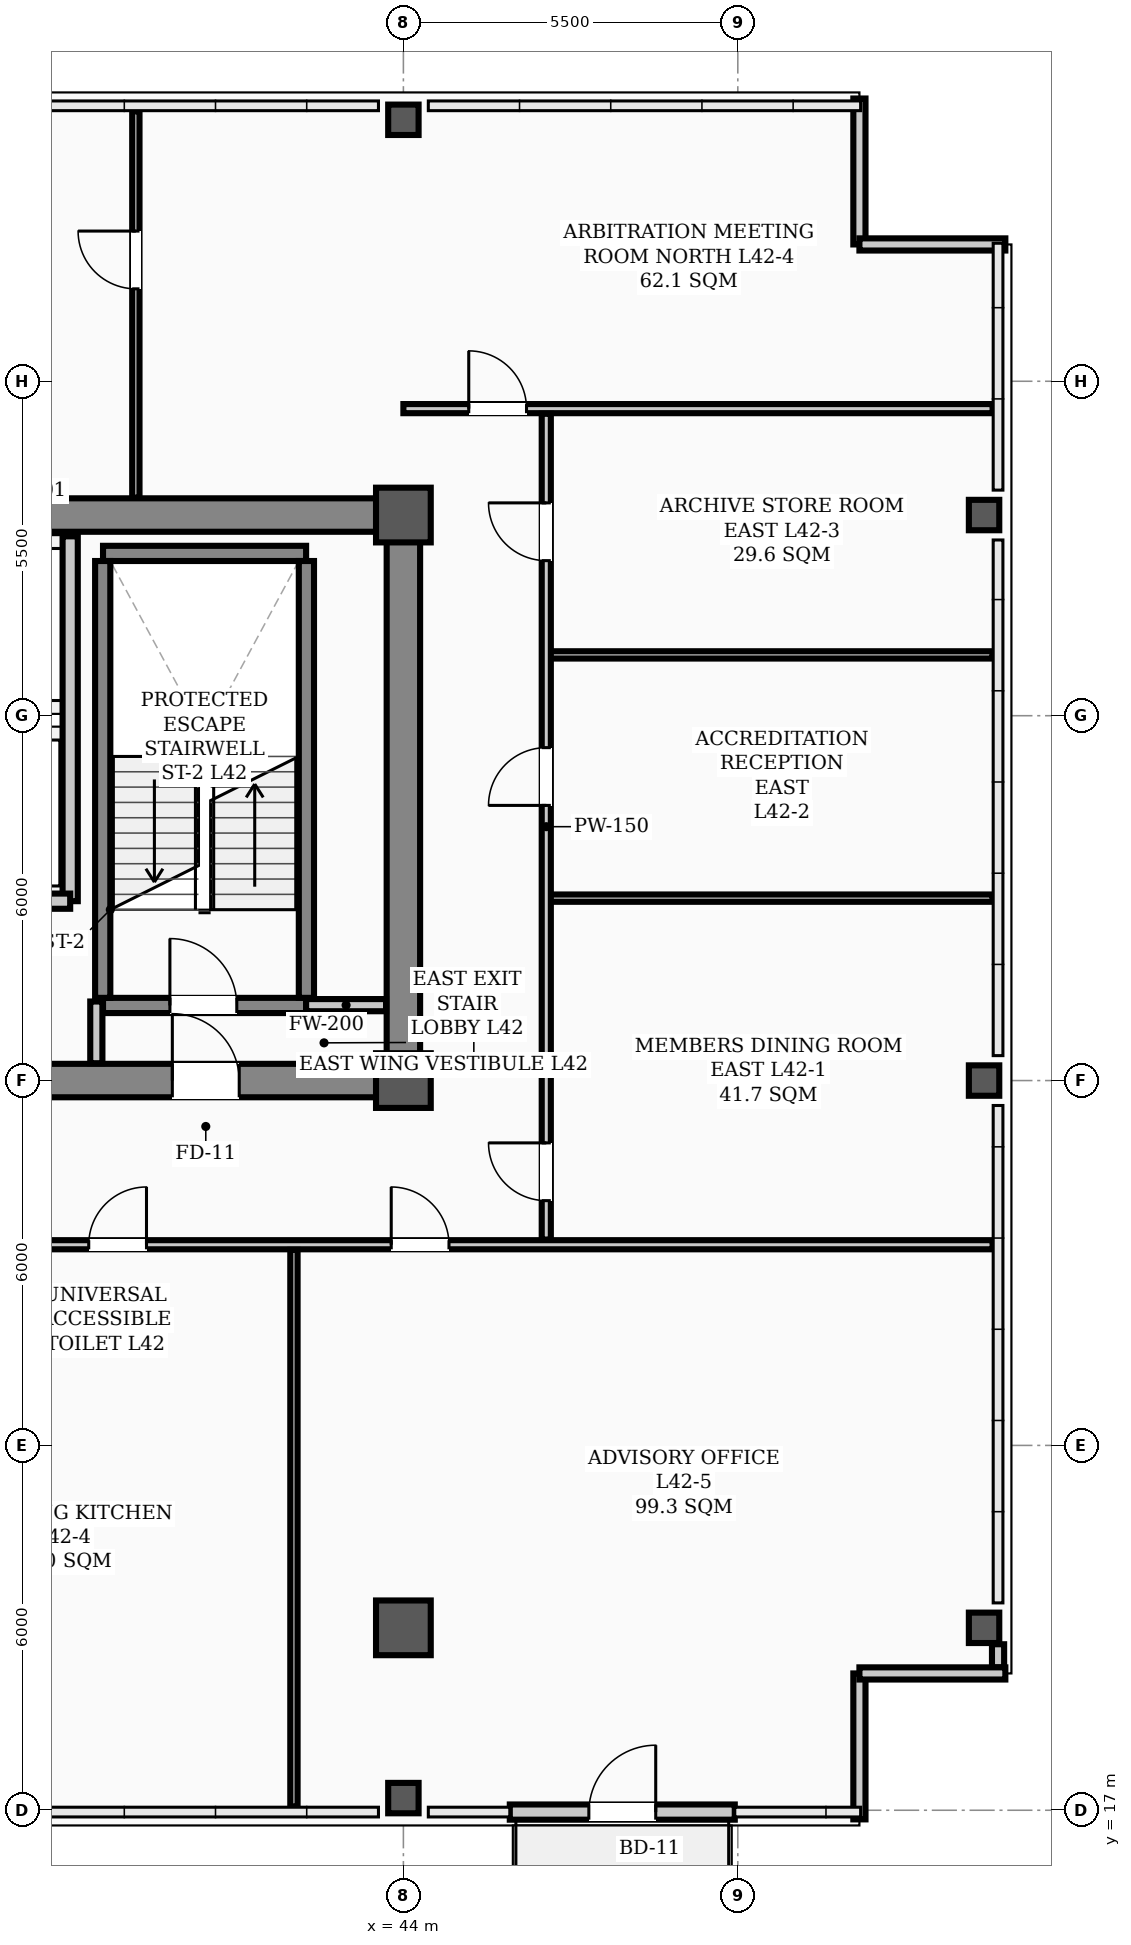
"""IFC4 building model, lengths in metres.
Left out: names, types, materials, properties, quantities, classifications, styles, units other than length and angle.
Written with IfcOpenShell. Run it as: python <this file> out.ifc"""

import sys

from ifc_helpers import new_model, si_unit, direction, frame, frame_2d, origin, origin_2d, place, context, subcontext, project, spatial, rectangle, hollow_rectangle, extrude, element, fill, save


model = new_model("IFC4")
c1 = context("Model", 3, precision=1e-05, world=origin(), true_north=direction((0.0, 1.0)))
c2 = subcontext(c1, "Body", "Model", "MODEL_VIEW")
j1 = project(units=[si_unit("LENGTHUNIT", "METRE"), si_unit("PLANEANGLEUNIT", "RADIAN")], contexts=[c1])
p1 = place(None, origin())
s1 = spatial("IfcSite", under=j1, at=p1, CompositionType="ELEMENT")
p2 = place(p1, origin())
s2 = spatial("IfcBuilding", under=s1, at=p2, CompositionType="ELEMENT")
p3 = place(p2, frame((0.0, 0.0, 169.5)))
s3 = spatial("IfcBuildingStorey", under=s2, at=p3, CompositionType="ELEMENT", Elevation=169.5)
for number, where, z_axis, x_axis in (
    (1, (44.0, 29.0, 0.0), (0.0, 0.0, 1.0), (1.0, 0.0, 0.0)),
    (2, (44.0, 38.3, 0.0), (0.0, 0.0, 1.0), (1.0, 0.0, 0.0)),
    (3, (44.0, 20.0, 0.0), (0.0, 0.0, 1.0), (1.0, 0.0, 0.0)),
):
    element("IfcColumn", number, at=place(p3, frame(where, z_axis=z_axis, x_axis=x_axis)), inside=s3, PredefinedType="COLUMN", context=c2, shape_type="SweptSolid", body=[
        extrude(hollow_rectangle(XDim=0.9, YDim=0.9, WallThickness=0.035, InnerFilletRadius=0.017, OuterFilletRadius=0.052, at=origin_2d()), origin(), (0.0, 0.0, 1.0), 3.9),
    ])
for number, where, z_axis, x_axis in (
    (4, (44.0, 17.2, 0.0), (0.0, 0.0, 1.0), (1.0, 0.0, 0.0)),
    (5, (44.0, 44.8, 0.0), (0.0, 0.0, 1.0), (1.0, 0.0, 0.0)),
    (6, (53.55, 20.0, 0.0), (0.0, 0.0, 1.0), (1.0, 0.0, 0.0)),
    (7, (53.55, 29.0, 0.0), (0.0, 0.0, 1.0), (1.0, 0.0, 0.0)),
    (8, (53.55, 38.3, 0.0), (0.0, 0.0, 1.0), (1.0, 0.0, 0.0)),
):
    element("IfcColumn", number, at=place(p3, frame(where, z_axis=z_axis, x_axis=x_axis)), inside=s3, PredefinedType="COLUMN", context=c2, shape_type="SweptSolid", body=[
        extrude(hollow_rectangle(XDim=0.5, YDim=0.5, WallThickness=0.024, InnerFilletRadius=0.012, OuterFilletRadius=0.036, at=origin_2d()), origin(), (0.0, 0.0, 1.0), 3.9),
    ])
p4 = place(p3, frame((53.78, 19.35, 0.0), z_axis=(0.0, 0.0, 1.0), x_axis=(0.0, 1.0, 0.0)))
e9 = element("IfcWall", 9, at=p4, inside=s3, PredefinedType="PARAPET", context=c2, shape_type="SweptSolid", body=[
    extrude(rectangle(XDim=0.38, YDim=0.2, at=frame_2d((0.19, 0.0))), origin(), (0.0, 0.0, 1.0), 1.2),
])
for number, where, z_axis, x_axis in (
    (10, (51.5, 16.85, 0.0), (0.0, 0.0, 1.0), (0.0, 1.0, 0.0)),
    (11, (51.5, 19.25, 0.0), (0.0, 0.0, 1.0), (1.0, 0.0, 0.0)),
    (12, (51.5, 45.15, 0.0), (0.0, 0.0, 1.0), (0.0, -1.0, 0.0)),
    (13, (51.5, 42.75, 0.0), (0.0, 0.0, 1.0), (1.0, 0.0, 0.0)),
):
    element("IfcWall", number, at=place(p3, frame(where, z_axis=z_axis, x_axis=x_axis)), inside=s3, PredefinedType="PARAPET", context=c2, shape_type="SweptSolid", body=[
        extrude(rectangle(XDim=2.4, YDim=0.2, at=frame_2d((1.2, 0.0))), origin(), (0.0, 0.0, 1.0), 1.2),
    ])
p5 = place(p3, frame((45.75, 16.97, 0.0), z_axis=(0.0, 0.0, 1.0), x_axis=(1.0, 0.0, 0.0)))
e14 = element("IfcWall", 14, at=p5, inside=s3, PredefinedType="STANDARD", context=c2, shape_type="SweptSolid", body=[
    extrude(rectangle(XDim=3.7, YDim=0.25, at=frame_2d((1.85, 0.0))), origin(), (0.0, 0.0, 1.0), 3.18),
])
p6 = place(p5, frame((1.3, 0.0, 0.0)))
e15 = element("IfcOpeningElement", 15, at=p6, cuts=e14, PredefinedType="OPENING", context=c2, shape_type="SweptSolid", body=[
    extrude(rectangle(XDim=1.1, YDim=2.2, at=frame_2d((0.55, 1.1))), frame((0.0, 0.135, 0.0), z_axis=(0.0, -1.0, 0.0), x_axis=(1.0, 0.0, 0.0)), (0.0, 0.0, 1.0), 0.27),
])
p7 = place(p3, frame((13.5, 29.0, 0.0), z_axis=(0.0, 0.0, 1.0), x_axis=(1.0, 0.0, 0.0)))
e16 = element("IfcWall", 16, at=p7, inside=s3, PredefinedType="SHEAR", context=c2, shape_type="SweptSolid", body=[
    extrude(rectangle(XDim=30.5, YDim=0.55, at=frame_2d((15.25, 0.0))), origin(), (0.0, 0.0, 1.0), 3.72),
])
p8 = place(p7, frame((1.75, 0.0, 0.0)))
e17 = element("IfcOpeningElement", 17, at=p8, cuts=e16, PredefinedType="OPENING", context=c2, shape_type="SweptSolid", body=[
    extrude(rectangle(XDim=1.1, YDim=2.08, at=frame_2d((0.55, 1.04))), frame((0.0, 0.285, 0.0), z_axis=(0.0, -1.0, 0.0), x_axis=(1.0, 0.0, 0.0)), (0.0, 0.0, 1.0), 0.57),
])
p9 = place(p7, frame((26.7, 0.0, 0.0)))
e18 = element("IfcOpeningElement", 18, at=p9, cuts=e16, PredefinedType="OPENING", context=c2, shape_type="SweptSolid", body=[
    extrude(rectangle(XDim=1.1, YDim=2.08, at=frame_2d((0.55, 1.04))), frame((0.0, 0.285, 0.0), z_axis=(0.0, -1.0, 0.0), x_axis=(1.0, 0.0, 0.0)), (0.0, 0.0, 1.0), 0.57),
])
p10 = place(p7, frame((6.8, 0.0, 0.0)))
e19 = element("IfcOpeningElement", 19, at=p10, cuts=e16, PredefinedType="OPENING", context=c2, shape_type="SweptSolid", body=[
    extrude(rectangle(XDim=1.1, YDim=2.08, at=frame_2d((0.55, 1.04))), frame((0.0, 0.285, 0.0), z_axis=(0.0, -1.0, 0.0), x_axis=(1.0, 0.0, 0.0)), (0.0, 0.0, 1.0), 0.57),
])
p11 = place(p7, frame((13.2, 0.0, 0.0)))
e20 = element("IfcOpeningElement", 20, at=p11, cuts=e16, PredefinedType="OPENING", context=c2, shape_type="SweptSolid", body=[
    extrude(rectangle(XDim=1.6, YDim=2.08, at=frame_2d((0.8, 1.04))), frame((0.0, 0.285, 0.0), z_axis=(0.0, -1.0, 0.0), x_axis=(1.0, 0.0, 0.0)), (0.0, 0.0, 1.0), 0.57),
])
p12 = place(p7, frame((20.525, 0.0, 0.0)))
e21 = element("IfcOpeningElement", 21, at=p12, cuts=e16, PredefinedType="OPENING", context=c2, shape_type="SweptSolid", body=[
    extrude(rectangle(XDim=0.95, YDim=2.08, at=frame_2d((0.475, 1.04))), frame((0.0, 0.285, 0.0), z_axis=(0.0, -1.0, 0.0), x_axis=(1.0, 0.0, 0.0)), (0.0, 0.0, 1.0), 0.57),
])
p13 = place(p3, frame((13.5, 38.3, 0.0), z_axis=(0.0, 0.0, 1.0), x_axis=(1.0, 0.0, 0.0)))
e22 = element("IfcWall", 22, at=p13, inside=s3, PredefinedType="SHEAR", context=c2, shape_type="SweptSolid", body=[
    extrude(rectangle(XDim=30.5, YDim=0.55, at=frame_2d((15.25, 0.0))), origin(), (0.0, 0.0, 1.0), 3.72),
])
p14 = place(p3, frame((44.0, 29.35, 0.0), z_axis=(0.0, 0.0, 1.0), x_axis=(0.0, 1.0, 0.0)))
e23 = element("IfcWall", 23, at=p14, inside=s3, PredefinedType="SHEAR", context=c2, shape_type="SweptSolid", body=[
    extrude(rectangle(XDim=8.6, YDim=0.55, at=frame_2d((4.3, 0.0))), origin(), (0.0, 0.0, 1.0), 3.72),
])
p15 = place(p3, frame((39.06, 30.235, 0.0), z_axis=(0.0, 0.0, 1.0), x_axis=(1.0, 0.0, 0.0)))
e24 = element("IfcWall", 24, at=p15, inside=s3, PredefinedType="STANDARD", context=c2, shape_type="SweptSolid", body=[
    extrude(rectangle(XDim=3.34, YDim=0.25, at=frame_2d((1.67, 0.0))), origin(), (0.0, 0.0, 1.0), 3.72),
])
p16 = place(p15, frame((1.1, 0.0, 0.0)))
e25 = element("IfcOpeningElement", 25, at=p16, cuts=e24, PredefinedType="OPENING", context=c2, shape_type="SweptSolid", body=[
    extrude(rectangle(XDim=1.1, YDim=2.08, at=frame_2d((0.55, 1.04))), frame((0.0, 0.135, 0.0), z_axis=(0.0, -1.0, 0.0), x_axis=(1.0, 0.0, 0.0)), (0.0, 0.0, 1.0), 0.27),
])
p17 = place(p3, frame((39.06, 37.669, 0.0), z_axis=(0.0, 0.0, 1.0), x_axis=(1.0, 0.0, 0.0)))
e26 = element("IfcWall", 26, at=p17, inside=s3, PredefinedType="STANDARD", context=c2, shape_type="SweptSolid", body=[
    extrude(rectangle(XDim=3.34, YDim=0.25, at=frame_2d((1.67, 0.0))), origin(), (0.0, 0.0, 1.0), 3.72),
])
for number, where, z_axis, x_axis in (
    (27, (39.055, 30.36, 0.0), (0.0, 0.0, 1.0), (0.0, 1.0, 0.0)),
    (28, (42.405, 30.36, 0.0), (0.0, 0.0, 1.0), (0.0, 1.0, 0.0)),
):
    element("IfcWall", number, at=place(p3, frame(where, z_axis=z_axis, x_axis=x_axis)), inside=s3, PredefinedType="STANDARD", context=c2, shape_type="SweptSolid", body=[
        extrude(rectangle(XDim=7.184, YDim=0.25, at=frame_2d((3.592, 0.0))), origin(), (0.0, 0.0, 1.0), 3.72),
    ])
p18 = place(p3, frame((38.52, 31.95, 0.0), z_axis=(0.0, 0.0, 1.0), x_axis=(0.0, 1.0, 0.0)))
e29 = element("IfcWall", 29, at=p18, inside=s3, PredefinedType="STANDARD", context=c2, shape_type="SweptSolid", body=[
    extrude(rectangle(XDim=6.0, YDim=0.25, at=frame_2d((3.0, 0.0))), origin(), (0.0, 0.0, 1.0), 3.35),
])
p19 = place(p3, frame((36.62, 31.95, 0.0), z_axis=(0.0, 0.0, 1.0), x_axis=(1.0, 0.0, 0.0)))
e30 = element("IfcWall", 30, at=p19, inside=s3, PredefinedType="STANDARD", context=c2, shape_type="SweptSolid", body=[
    extrude(rectangle(XDim=1.9, YDim=0.25, at=frame_2d((0.95, 0.0))), origin(), (0.0, 0.0, 1.0), 3.48),
])
p20 = place(p3, frame((42.4, 30.24, 0.0), z_axis=(0.0, 0.0, 1.0), x_axis=(1.0, 0.0, 0.0)))
e31 = element("IfcWall", 31, at=p20, inside=s3, PredefinedType="STANDARD", context=c2, shape_type="SweptSolid", body=[
    extrude(rectangle(XDim=1.315, YDim=0.2, at=frame_2d((0.658, 0.0))), origin(), (0.0, 0.0, 1.0), 3.2),
])
p21 = place(p3, frame((10.31, 26.3, 0.0), z_axis=(0.0, 0.0, 1.0), x_axis=(1.0, 0.0, 0.0)))
e32 = element("IfcWall", 32, at=p21, inside=s3, PredefinedType="PARTITIONING", context=c2, shape_type="SweptSolid", body=[
    extrude(rectangle(XDim=43.38, YDim=0.15, at=frame_2d((21.69, 0.0))), origin(), (0.0, 0.0, 1.0), 3.2),
])
p22 = place(p21, frame((4.87, 0.0, 0.0)))
e33 = element("IfcOpeningElement", 33, at=p22, cuts=e32, PredefinedType="OPENING", context=c2, shape_type="SweptSolid", body=[
    extrude(rectangle(XDim=0.95, YDim=2.08, at=frame_2d((0.475, 1.04))), frame((0.0, 0.085, 0.0), z_axis=(0.0, -1.0, 0.0), x_axis=(1.0, 0.0, 0.0)), (0.0, 0.0, 1.0), 0.17),
])
p23 = place(p21, frame((11.115, 0.0, 0.0)))
e34 = element("IfcOpeningElement", 34, at=p23, cuts=e32, PredefinedType="OPENING", context=c2, shape_type="SweptSolid", body=[
    extrude(rectangle(XDim=0.95, YDim=2.08, at=frame_2d((0.475, 1.04))), frame((0.0, 0.085, 0.0), z_axis=(0.0, -1.0, 0.0), x_axis=(1.0, 0.0, 0.0)), (0.0, 0.0, 1.0), 0.17),
])
p24 = place(p21, frame((17.915, 0.0, 0.0)))
e35 = element("IfcOpeningElement", 35, at=p24, cuts=e32, PredefinedType="OPENING", context=c2, shape_type="SweptSolid", body=[
    extrude(rectangle(XDim=0.95, YDim=2.08, at=frame_2d((0.475, 1.04))), frame((0.0, 0.085, 0.0), z_axis=(0.0, -1.0, 0.0), x_axis=(1.0, 0.0, 0.0)), (0.0, 0.0, 1.0), 0.17),
])
p25 = place(p21, frame((28.515, 0.0, 0.0)))
e36 = element("IfcOpeningElement", 36, at=p25, cuts=e32, PredefinedType="OPENING", context=c2, shape_type="SweptSolid", body=[
    extrude(rectangle(XDim=0.95, YDim=2.08, at=frame_2d((0.475, 1.04))), frame((0.0, 0.085, 0.0), z_axis=(0.0, -1.0, 0.0), x_axis=(1.0, 0.0, 0.0)), (0.0, 0.0, 1.0), 0.17),
])
p26 = place(p21, frame((33.49, 0.0, 0.0)))
e37 = element("IfcOpeningElement", 37, at=p26, cuts=e32, PredefinedType="OPENING", context=c2, shape_type="SweptSolid", body=[
    extrude(rectangle(XDim=0.95, YDim=2.08, at=frame_2d((0.475, 1.04))), frame((0.0, 0.085, 0.0), z_axis=(0.0, -1.0, 0.0), x_axis=(1.0, 0.0, 0.0)), (0.0, 0.0, 1.0), 0.17),
])
for number, where, z_axis, x_axis in (
    (38, (46.35, 32.0, 0.0), (0.0, 0.0, 1.0), (1.0, 0.0, 0.0)),
    (39, (46.35, 36.0, 0.0), (0.0, 0.0, 1.0), (1.0, 0.0, 0.0)),
):
    element("IfcWall", number, at=place(p3, frame(where, z_axis=z_axis, x_axis=x_axis)), inside=s3, PredefinedType="PARTITIONING", context=c2, shape_type="SweptSolid", body=[
        extrude(rectangle(XDim=7.34, YDim=0.12, at=frame_2d((3.67, 0.0))), origin(), (0.0, 0.0, 1.0), 3.212),
    ])
p27 = place(p3, frame((44.0, 40.05, 0.0), z_axis=(0.0, 0.0, 1.0), x_axis=(1.0, 0.0, 0.0)))
e40 = element("IfcWall", 40, at=p27, inside=s3, PredefinedType="PARTITIONING", context=c2, shape_type="SweptSolid", body=[
    extrude(rectangle(XDim=9.69, YDim=0.15, at=frame_2d((4.845, 0.0))), origin(), (0.0, 0.0, 1.0), 3.2),
])
p28 = place(p27, frame((1.075, 0.0, 0.0)))
e41 = element("IfcOpeningElement", 41, at=p28, cuts=e40, PredefinedType="OPENING", context=c2, shape_type="SweptSolid", body=[
    extrude(rectangle(XDim=0.95, YDim=2.08, at=frame_2d((0.475, 1.04))), frame((0.0, 0.085, 0.0), z_axis=(0.0, -1.0, 0.0), x_axis=(1.0, 0.0, 0.0)), (0.0, 0.0, 1.0), 0.17),
])
p29 = place(p3, frame((38.95, 29.285, 0.0), z_axis=(0.0, 0.0, 1.0), x_axis=(0.0, 1.0, 0.0)))
e42 = element("IfcWall", 42, at=p29, inside=s3, PredefinedType="STANDARD", context=c2, shape_type="SweptSolid", body=[
    extrude(rectangle(XDim=1.015, YDim=0.2, at=frame_2d((0.508, 0.0))), origin(), (0.0, 0.0, 1.0), 3.35),
])
p30 = place(p3, frame((46.35, 26.385, 0.0), z_axis=(0.0, 0.0, 1.0), x_axis=(0.0, 1.0, 0.0)))
e43 = element("IfcWall", 43, at=p30, inside=s3, PredefinedType="PARTITIONING", context=c2, shape_type="SweptSolid", body=[
    extrude(rectangle(XDim=13.58, YDim=0.15, at=frame_2d((6.79, 0.0))), origin(), (0.0, 0.0, 1.0), 3.1),
])
p31 = place(p30, frame((0.64, 0.0, 0.0)))
e44 = element("IfcOpeningElement", 44, at=p31, cuts=e43, PredefinedType="OPENING", context=c2, shape_type="SweptSolid", body=[
    extrude(rectangle(XDim=0.95, YDim=2.08, at=frame_2d((0.475, 1.04))), frame((0.0, 0.085, 0.0), z_axis=(0.0, -1.0, 0.0), x_axis=(1.0, 0.0, 0.0)), (0.0, 0.0, 1.0), 0.17),
])
p32 = place(p30, frame((7.14, 0.0, 0.0)))
e45 = element("IfcOpeningElement", 45, at=p32, cuts=e43, PredefinedType="OPENING", context=c2, shape_type="SweptSolid", body=[
    extrude(rectangle(XDim=0.95, YDim=2.08, at=frame_2d((0.475, 1.04))), frame((0.0, 0.085, 0.0), z_axis=(0.0, -1.0, 0.0), x_axis=(1.0, 0.0, 0.0)), (0.0, 0.0, 1.0), 0.17),
])
p33 = place(p30, frame((11.165, 0.0, 0.0)))
e46 = element("IfcOpeningElement", 46, at=p33, cuts=e43, PredefinedType="OPENING", context=c2, shape_type="SweptSolid", body=[
    extrude(rectangle(XDim=0.95, YDim=2.08, at=frame_2d((0.475, 1.04))), frame((0.0, 0.085, 0.0), z_axis=(0.0, -1.0, 0.0), x_axis=(1.0, 0.0, 0.0)), (0.0, 0.0, 1.0), 0.17),
])
p34 = place(p3, frame((42.2, 17.06, 0.0), z_axis=(0.0, 0.0, 1.0), x_axis=(0.0, 1.0, 0.0)))
e47 = element("IfcWall", 47, at=p34, inside=s3, PredefinedType="PARTITIONING", context=c2, shape_type="SweptSolid", body=[
    extrude(rectangle(XDim=9.155, YDim=0.12, at=frame_2d((4.578, 0.0))), origin(), (0.0, 0.0, 1.0), 3.1),
])
p35 = place(p3, frame((39.6, 38.585, 0.0), z_axis=(0.0, 0.0, 1.0), x_axis=(0.0, 1.0, 0.0)))
e48 = element("IfcWall", 48, at=p35, inside=s3, PredefinedType="PARTITIONING", context=c2, shape_type="SweptSolid", body=[
    extrude(rectangle(XDim=6.355, YDim=0.12, at=frame_2d((3.177, 0.0))), origin(), (0.0, 0.0, 1.0), 3.212),
])
p36 = place(p35, frame((3.435, 0.0, 0.0)))
e49 = element("IfcOpeningElement", 49, at=p36, cuts=e48, PredefinedType="OPENING", context=c2, shape_type="SweptSolid", body=[
    extrude(rectangle(XDim=0.95, YDim=2.08, at=frame_2d((0.475, 1.04))), frame((0.0, 0.07, 0.0), z_axis=(0.0, -1.0, 0.0), x_axis=(1.0, 0.0, 0.0)), (0.0, 0.0, 1.0), 0.14),
])
p37 = place(p6, origin())
e50 = element("IfcDoor", 50, at=p37, inside=s3, OperationType="SINGLE_SWING_RIGHT", PredefinedType="DOOR", context=c2, shape_type="SweptSolid", body=[
    extrude(rectangle(XDim=1.1, YDim=2.2, at=frame_2d((0.55, 1.1))), frame((0.0, 0.025, 0.0), z_axis=(0.0, -1.0, 0.0), x_axis=(1.0, 0.0, 0.0)), (0.0, 0.0, 1.0), 0.05),
])
fill(e15, e50)
p38 = place(p16, origin())
e51 = element("IfcDoor", 51, at=p38, inside=s3, OperationType="SINGLE_SWING_LEFT", PredefinedType="DOOR", context=c2, shape_type="SweptSolid", body=[
    extrude(rectangle(XDim=1.1, YDim=2.08, at=frame_2d((0.55, 1.04))), frame((0.0, 0.025, 0.0), z_axis=(0.0, -1.0, 0.0), x_axis=(1.0, 0.0, 0.0)), (0.0, 0.0, 1.0), 0.05),
])
fill(e25, e51)
p39 = place(p9, origin())
e52 = element("IfcDoor", 52, at=p39, inside=s3, OperationType="SINGLE_SWING_LEFT", PredefinedType="DOOR", context=c2, shape_type="SweptSolid", body=[
    extrude(rectangle(XDim=1.1, YDim=2.08, at=frame_2d((0.55, 1.04))), frame((0.0, 0.025, 0.0), z_axis=(0.0, -1.0, 0.0), x_axis=(1.0, 0.0, 0.0)), (0.0, 0.0, 1.0), 0.05),
])
fill(e18, e52)
p40 = place(p25, origin())
e53 = element("IfcDoor", 53, at=p40, inside=s3, OperationType="SINGLE_SWING_RIGHT", PredefinedType="DOOR", context=c2, shape_type="SweptSolid", body=[
    extrude(rectangle(XDim=0.95, YDim=2.08, at=frame_2d((0.475, 1.04))), frame((0.0, 0.025, 0.0), z_axis=(0.0, -1.0, 0.0), x_axis=(1.0, 0.0, 0.0)), (0.0, 0.0, 1.0), 0.05),
])
fill(e36, e53)
p41 = place(p26, origin())
e54 = element("IfcDoor", 54, at=p41, inside=s3, OperationType="SINGLE_SWING_LEFT", PredefinedType="DOOR", context=c2, shape_type="SweptSolid", body=[
    extrude(rectangle(XDim=0.95, YDim=2.08, at=frame_2d((0.475, 1.04))), frame((0.0, 0.025, 0.0), z_axis=(0.0, -1.0, 0.0), x_axis=(1.0, 0.0, 0.0)), (0.0, 0.0, 1.0), 0.05),
])
fill(e37, e54)
p42 = place(p31, origin())
e55 = element("IfcDoor", 55, at=p42, inside=s3, OperationType="SINGLE_SWING_RIGHT", PredefinedType="DOOR", context=c2, shape_type="SweptSolid", body=[
    extrude(rectangle(XDim=0.95, YDim=2.08, at=frame_2d((0.475, 1.04))), frame((0.0, 0.025, 0.0), z_axis=(0.0, -1.0, 0.0), x_axis=(1.0, 0.0, 0.0)), (0.0, 0.0, 1.0), 0.05),
])
fill(e44, e55)
p43 = place(p32, origin())
e56 = element("IfcDoor", 56, at=p43, inside=s3, OperationType="SINGLE_SWING_LEFT", PredefinedType="DOOR", context=c2, shape_type="SweptSolid", body=[
    extrude(rectangle(XDim=0.95, YDim=2.08, at=frame_2d((0.475, 1.04))), frame((0.0, 0.025, 0.0), z_axis=(0.0, -1.0, 0.0), x_axis=(1.0, 0.0, 0.0)), (0.0, 0.0, 1.0), 0.05),
])
fill(e45, e56)
p44 = place(p33, origin())
e57 = element("IfcDoor", 57, at=p44, inside=s3, OperationType="SINGLE_SWING_RIGHT", PredefinedType="DOOR", context=c2, shape_type="SweptSolid", body=[
    extrude(rectangle(XDim=0.95, YDim=2.08, at=frame_2d((0.475, 1.04))), frame((0.0, 0.025, 0.0), z_axis=(0.0, -1.0, 0.0), x_axis=(1.0, 0.0, 0.0)), (0.0, 0.0, 1.0), 0.05),
])
fill(e46, e57)
p45 = place(p28, origin())
e58 = element("IfcDoor", 58, at=p45, inside=s3, OperationType="SINGLE_SWING_LEFT", PredefinedType="DOOR", context=c2, shape_type="SweptSolid", body=[
    extrude(rectangle(XDim=0.95, YDim=2.08, at=frame_2d((0.475, 1.04))), frame((0.0, 0.025, 0.0), z_axis=(0.0, -1.0, 0.0), x_axis=(1.0, 0.0, 0.0)), (0.0, 0.0, 1.0), 0.05),
])
fill(e41, e58)
p46 = place(p36, origin())
e59 = element("IfcDoor", 59, at=p46, inside=s3, OperationType="SINGLE_SWING_RIGHT", PredefinedType="DOOR", context=c2, shape_type="SweptSolid", body=[
    extrude(rectangle(XDim=0.95, YDim=2.08, at=frame_2d((0.475, 1.04))), frame((0.0, 0.025, 0.0), z_axis=(0.0, -1.0, 0.0), x_axis=(1.0, 0.0, 0.0)), (0.0, 0.0, 1.0), 0.05),
])
fill(e49, e59)
save(model, sys.argv[1])
